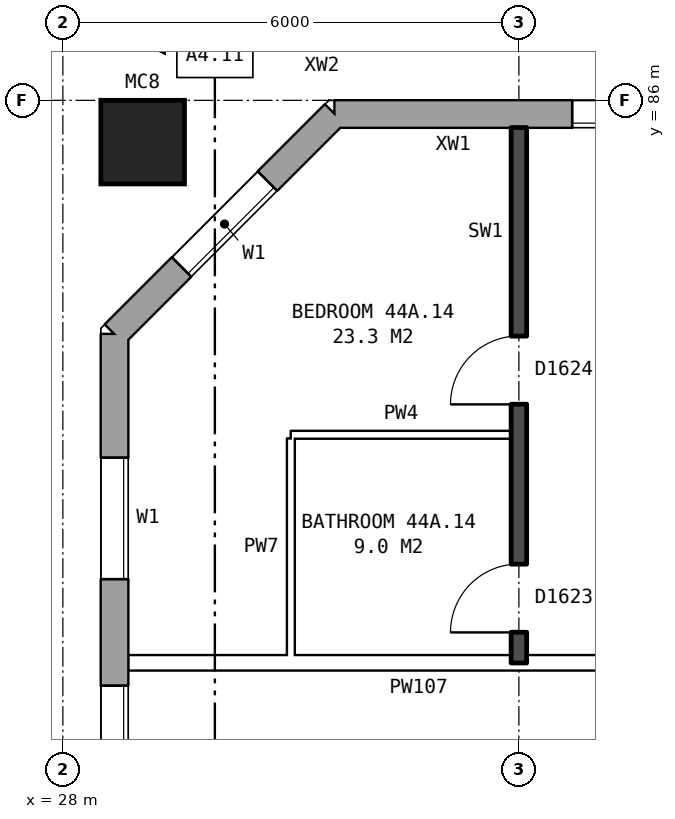
"""IFC4 building model, lengths in metres.
Left out: names, types, materials, properties, quantities, classifications, styles, units other than length and angle.
Written with IfcOpenShell. Run it as: python <this file> out.ifc"""

import sys

from ifc_helpers import new_model, si_unit, direction, frame, frame_2d, origin, origin_2d, place, context, subcontext, project, spatial, rectangle, hollow_rectangle, extrude, element, fill, save


model = new_model("IFC4")
c1 = context("Model", 3, precision=1e-05, world=origin(), true_north=direction((0.0, 1.0)))
c2 = subcontext(c1, "Body", "Model", "MODEL_VIEW")
j1 = project(units=[si_unit("LENGTHUNIT", "METRE"), si_unit("PLANEANGLEUNIT", "RADIAN")], contexts=[c1])
p1 = place(None, origin())
s1 = spatial("IfcSite", under=j1, at=p1, CompositionType="ELEMENT")
p2 = place(p1, origin())
s2 = spatial("IfcBuilding", under=s1, at=p2, CompositionType="ELEMENT")
p3 = place(p2, frame((0.0, 0.0, 157.8)))
s3 = spatial("IfcBuildingStorey", under=s2, at=p3, CompositionType="ELEMENT", Elevation=157.8)
p4 = place(p3, frame((29.05, 85.45, 0.0), z_axis=(0.0, 0.0, 1.0), x_axis=(1.0, 0.0, 0.0)))
e1 = element("IfcColumn", 1, at=p4, inside=s3, PredefinedType="COLUMN", context=c2, shape_type="SweptSolid", body=[
    extrude(hollow_rectangle(XDim=1.1, YDim=1.1, WallThickness=0.06, at=origin_2d()), origin(), (0.0, 0.0, 1.0), 3.1),
])
p5 = place(p3, frame((72.925, 85.82, 0.0), z_axis=(0.0, 0.0, 1.0), x_axis=(-1.0, 0.0, 0.0)))
e2 = element("IfcWall", 2, at=p5, inside=s3, PredefinedType="STANDARD", context=c2, shape_type="SweptSolid", body=[
    extrude(rectangle(XDim=41.351, YDim=0.36, at=frame_2d((20.675, 0.0))), origin(), (0.0, 0.0, 1.0), 2.85),
])
p6 = place(p5, frame((0.625, 0.0, 0.8)))
e3 = element("IfcOpeningElement", 3, at=p6, cuts=e2, PredefinedType="OPENING", context=c2, shape_type="SweptSolid", body=[
    extrude(rectangle(XDim=1.6, YDim=1.8, at=frame_2d((0.8, 0.9))), frame((0.0, 0.19, 0.0), z_axis=(0.0, -1.0, 0.0), x_axis=(1.0, 0.0, 0.0)), (0.0, 0.0, 1.0), 0.38),
])
p7 = place(p5, frame((3.625, 0.0, 0.8)))
e4 = element("IfcOpeningElement", 4, at=p7, cuts=e2, PredefinedType="OPENING", context=c2, shape_type="SweptSolid", body=[
    extrude(rectangle(XDim=1.6, YDim=1.8, at=frame_2d((0.8, 0.9))), frame((0.0, 0.19, 0.0), z_axis=(0.0, -1.0, 0.0), x_axis=(1.0, 0.0, 0.0)), (0.0, 0.0, 1.0), 0.38),
])
p8 = place(p5, frame((6.625, 0.0, 0.8)))
e5 = element("IfcOpeningElement", 5, at=p8, cuts=e2, PredefinedType="OPENING", context=c2, shape_type="SweptSolid", body=[
    extrude(rectangle(XDim=1.6, YDim=1.8, at=frame_2d((0.8, 0.9))), frame((0.0, 0.19, 0.0), z_axis=(0.0, -1.0, 0.0), x_axis=(1.0, 0.0, 0.0)), (0.0, 0.0, 1.0), 0.38),
])
p9 = place(p5, frame((9.125, 0.0, 0.8)))
e6 = element("IfcOpeningElement", 6, at=p9, cuts=e2, PredefinedType="OPENING", context=c2, shape_type="SweptSolid", body=[
    extrude(rectangle(XDim=0.6, YDim=1.8, at=frame_2d((0.3, 0.9))), frame((0.0, 0.19, 0.0), z_axis=(0.0, -1.0, 0.0), x_axis=(1.0, 0.0, 0.0)), (0.0, 0.0, 1.0), 0.38),
])
p10 = place(p5, frame((12.125, 0.0, 0.8)))
e7 = element("IfcOpeningElement", 7, at=p10, cuts=e2, PredefinedType="OPENING", context=c2, shape_type="SweptSolid", body=[
    extrude(rectangle(XDim=0.8, YDim=0.9, at=frame_2d((0.4, 0.45))), frame((0.0, 0.19, 0.0), z_axis=(0.0, -1.0, 0.0), x_axis=(1.0, 0.0, 0.0)), (0.0, 0.0, 1.0), 0.38),
])
p11 = place(p5, frame((15.625, 0.0, 0.8)))
e8 = element("IfcOpeningElement", 8, at=p11, cuts=e2, PredefinedType="OPENING", context=c2, shape_type="SweptSolid", body=[
    extrude(rectangle(XDim=1.6, YDim=1.8, at=frame_2d((0.8, 0.9))), frame((0.0, 0.19, 0.0), z_axis=(0.0, -1.0, 0.0), x_axis=(1.0, 0.0, 0.0)), (0.0, 0.0, 1.0), 0.38),
])
p12 = place(p5, frame((18.625, 0.0, 0.8)))
e9 = element("IfcOpeningElement", 9, at=p12, cuts=e2, PredefinedType="OPENING", context=c2, shape_type="SweptSolid", body=[
    extrude(rectangle(XDim=1.6, YDim=1.8, at=frame_2d((0.8, 0.9))), frame((0.0, 0.19, 0.0), z_axis=(0.0, -1.0, 0.0), x_axis=(1.0, 0.0, 0.0)), (0.0, 0.0, 1.0), 0.38),
])
p13 = place(p5, frame((21.625, 0.0, 0.8)))
e10 = element("IfcOpeningElement", 10, at=p13, cuts=e2, PredefinedType="OPENING", context=c2, shape_type="SweptSolid", body=[
    extrude(rectangle(XDim=1.6, YDim=1.8, at=frame_2d((0.8, 0.9))), frame((0.0, 0.19, 0.0), z_axis=(0.0, -1.0, 0.0), x_axis=(1.0, 0.0, 0.0)), (0.0, 0.0, 1.0), 0.38),
])
p14 = place(p5, frame((24.625, 0.0, 0.8)))
e11 = element("IfcOpeningElement", 11, at=p14, cuts=e2, PredefinedType="OPENING", context=c2, shape_type="SweptSolid", body=[
    extrude(rectangle(XDim=1.6, YDim=1.8, at=frame_2d((0.8, 0.9))), frame((0.0, 0.19, 0.0), z_axis=(0.0, -1.0, 0.0), x_axis=(1.0, 0.0, 0.0)), (0.0, 0.0, 1.0), 0.38),
])
p15 = place(p5, frame((27.125, 0.0, 0.8)))
e12 = element("IfcOpeningElement", 12, at=p15, cuts=e2, PredefinedType="OPENING", context=c2, shape_type="SweptSolid", body=[
    extrude(rectangle(XDim=0.8, YDim=1.8, at=frame_2d((0.4, 0.9))), frame((0.0, 0.19, 0.0), z_axis=(0.0, -1.0, 0.0), x_axis=(1.0, 0.0, 0.0)), (0.0, 0.0, 1.0), 0.38),
])
p16 = place(p5, frame((28.225, 0.0, 0.8)))
e13 = element("IfcOpeningElement", 13, at=p16, cuts=e2, PredefinedType="OPENING", context=c2, shape_type="SweptSolid", body=[
    extrude(rectangle(XDim=1.0, YDim=0.9, at=frame_2d((0.5, 0.45))), frame((0.0, 0.19, 0.0), z_axis=(0.0, -1.0, 0.0), x_axis=(1.0, 0.0, 0.0)), (0.0, 0.0, 1.0), 0.38),
])
p17 = place(p5, frame((33.625, 0.0, 0.8)))
e14 = element("IfcOpeningElement", 14, at=p17, cuts=e2, PredefinedType="OPENING", context=c2, shape_type="SweptSolid", body=[
    extrude(rectangle(XDim=1.6, YDim=1.8, at=frame_2d((0.8, 0.9))), frame((0.0, 0.19, 0.0), z_axis=(0.0, -1.0, 0.0), x_axis=(1.0, 0.0, 0.0)), (0.0, 0.0, 1.0), 0.38),
])
p18 = place(p5, frame((36.625, 0.0, 0.8)))
e15 = element("IfcOpeningElement", 15, at=p18, cuts=e2, PredefinedType="OPENING", context=c2, shape_type="SweptSolid", body=[
    extrude(rectangle(XDim=1.6, YDim=1.8, at=frame_2d((0.8, 0.9))), frame((0.0, 0.19, 0.0), z_axis=(0.0, -1.0, 0.0), x_axis=(1.0, 0.0, 0.0)), (0.0, 0.0, 1.0), 0.38),
])
p19 = place(p5, frame((10.025, 0.0, 1.7)))
e16 = element("IfcOpeningElement", 16, at=p19, cuts=e2, PredefinedType="OPENING", context=c2, shape_type="SweptSolid", body=[
    extrude(rectangle(XDim=0.8, YDim=0.9, at=frame_2d((0.4, 0.45))), frame((0.0, 0.19, 0.0), z_axis=(0.0, -1.0, 0.0), x_axis=(1.0, 0.0, 0.0)), (0.0, 0.0, 1.0), 0.38),
])
p20 = place(p5, frame((13.275, 0.0, 0.8)))
e17 = element("IfcOpeningElement", 17, at=p20, cuts=e2, PredefinedType="OPENING", context=c2, shape_type="SweptSolid", body=[
    extrude(rectangle(XDim=1.4, YDim=1.8, at=frame_2d((0.7, 0.9))), frame((0.0, 0.19, 0.0), z_axis=(0.0, -1.0, 0.0), x_axis=(1.0, 0.0, 0.0)), (0.0, 0.0, 1.0), 0.38),
])
p21 = place(p5, frame((30.475, 0.0, 1.7)))
e18 = element("IfcOpeningElement", 18, at=p21, cuts=e2, PredefinedType="OPENING", context=c2, shape_type="SweptSolid", body=[
    extrude(rectangle(XDim=0.8, YDim=0.9, at=frame_2d((0.4, 0.45))), frame((0.0, 0.19, 0.0), z_axis=(0.0, -1.0, 0.0), x_axis=(1.0, 0.0, 0.0)), (0.0, 0.0, 1.0), 0.38),
])
p22 = place(p5, frame((31.625, 0.0, 0.8)))
e19 = element("IfcOpeningElement", 19, at=p22, cuts=e2, PredefinedType="OPENING", context=c2, shape_type="SweptSolid", body=[
    extrude(rectangle(XDim=1.0, YDim=1.8, at=frame_2d((0.5, 0.9))), frame((0.0, 0.19, 0.0), z_axis=(0.0, -1.0, 0.0), x_axis=(1.0, 0.0, 0.0)), (0.0, 0.0, 1.0), 0.38),
])
p23 = place(p3, frame((31.575, 85.82, 0.0), z_axis=(0.0, 0.0, 1.0), x_axis=(-0.707106781187, -0.707106781187, 0.0)))
e20 = element("IfcWall", 20, at=p23, inside=s3, PredefinedType="STANDARD", context=c2, shape_type="SweptSolid", body=[
    extrude(rectangle(XDim=4.094, YDim=0.36, at=frame_2d((2.047, 0.0))), origin(), (0.0, 0.0, 1.0), 2.85),
])
p24 = place(p23, frame((1.247, 0.0, 0.8)))
e21 = element("IfcOpeningElement", 21, at=p24, cuts=e20, PredefinedType="OPENING", context=c2, shape_type="SweptSolid", body=[
    extrude(rectangle(XDim=1.6, YDim=1.8, at=frame_2d((0.8, 0.9))), frame((0.0, 0.19, 0.0), z_axis=(0.0, -1.0, 0.0), x_axis=(1.0, 0.0, 0.0)), (0.0, 0.0, 1.0), 0.38),
])
p25 = place(p3, frame((28.68, 82.925, 0.0), z_axis=(0.0, 0.0, 1.0), x_axis=(0.0, -1.0, 0.0)))
e22 = element("IfcWall", 22, at=p25, inside=s3, PredefinedType="STANDARD", context=c2, shape_type="SweptSolid", body=[
    extrude(rectangle(XDim=25.851, YDim=0.36, at=frame_2d((12.925, 0.0))), origin(), (0.0, 0.0, 1.0), 2.85),
])
p26 = place(p25, frame((1.625, 0.0, 0.8)))
e23 = element("IfcOpeningElement", 23, at=p26, cuts=e22, PredefinedType="OPENING", context=c2, shape_type="SweptSolid", body=[
    extrude(rectangle(XDim=1.6, YDim=1.8, at=frame_2d((0.8, 0.9))), frame((0.0, 0.19, 0.0), z_axis=(0.0, -1.0, 0.0), x_axis=(1.0, 0.0, 0.0)), (0.0, 0.0, 1.0), 0.38),
])
p27 = place(p25, frame((4.625, 0.0, 0.8)))
e24 = element("IfcOpeningElement", 24, at=p27, cuts=e22, PredefinedType="OPENING", context=c2, shape_type="SweptSolid", body=[
    extrude(rectangle(XDim=1.6, YDim=1.8, at=frame_2d((0.8, 0.9))), frame((0.0, 0.19, 0.0), z_axis=(0.0, -1.0, 0.0), x_axis=(1.0, 0.0, 0.0)), (0.0, 0.0, 1.0), 0.38),
])
p28 = place(p25, frame((6.525, 0.0, 0.8)))
e25 = element("IfcOpeningElement", 25, at=p28, cuts=e22, PredefinedType="OPENING", context=c2, shape_type="SweptSolid", body=[
    extrude(rectangle(XDim=1.6, YDim=1.5, at=frame_2d((0.8, 0.75))), frame((0.0, 0.19, 0.0), z_axis=(0.0, -1.0, 0.0), x_axis=(1.0, 0.0, 0.0)), (0.0, 0.0, 1.0), 0.38),
])
p29 = place(p25, frame((8.425, 0.0, 0.8)))
e26 = element("IfcOpeningElement", 26, at=p29, cuts=e22, PredefinedType="OPENING", context=c2, shape_type="SweptSolid", body=[
    extrude(rectangle(XDim=0.6, YDim=0.9, at=frame_2d((0.3, 0.45))), frame((0.0, 0.19, 0.0), z_axis=(0.0, -1.0, 0.0), x_axis=(1.0, 0.0, 0.0)), (0.0, 0.0, 1.0), 0.38),
])
p30 = place(p25, frame((10.225, 0.0, 1.7)))
e27 = element("IfcOpeningElement", 27, at=p30, cuts=e22, PredefinedType="OPENING", context=c2, shape_type="SweptSolid", body=[
    extrude(rectangle(XDim=1.2, YDim=0.9, at=frame_2d((0.6, 0.45))), frame((0.0, 0.19, 0.0), z_axis=(0.0, -1.0, 0.0), x_axis=(1.0, 0.0, 0.0)), (0.0, 0.0, 1.0), 0.38),
])
p31 = place(p25, frame((11.725, 0.0, 0.8)))
e28 = element("IfcOpeningElement", 28, at=p31, cuts=e22, PredefinedType="OPENING", context=c2, shape_type="SweptSolid", body=[
    extrude(rectangle(XDim=1.6, YDim=1.8, at=frame_2d((0.8, 0.9))), frame((0.0, 0.19, 0.0), z_axis=(0.0, -1.0, 0.0), x_axis=(1.0, 0.0, 0.0)), (0.0, 0.0, 1.0), 0.38),
])
p32 = place(p25, frame((19.625, 0.0, 0.8)))
e29 = element("IfcOpeningElement", 29, at=p32, cuts=e22, PredefinedType="OPENING", context=c2, shape_type="SweptSolid", body=[
    extrude(rectangle(XDim=1.6, YDim=1.8, at=frame_2d((0.8, 0.9))), frame((0.0, 0.19, 0.0), z_axis=(0.0, -1.0, 0.0), x_axis=(1.0, 0.0, 0.0)), (0.0, 0.0, 1.0), 0.38),
])
p33 = place(p25, frame((22.625, 0.0, 0.8)))
e30 = element("IfcOpeningElement", 30, at=p33, cuts=e22, PredefinedType="OPENING", context=c2, shape_type="SweptSolid", body=[
    extrude(rectangle(XDim=1.6, YDim=1.8, at=frame_2d((0.8, 0.9))), frame((0.0, 0.19, 0.0), z_axis=(0.0, -1.0, 0.0), x_axis=(1.0, 0.0, 0.0)), (0.0, 0.0, 1.0), 0.38),
])
p34 = place(p25, frame((13.625, 0.0, 1.1)))
e31 = element("IfcOpeningElement", 31, at=p34, cuts=e22, PredefinedType="OPENING", context=c2, shape_type="SweptSolid", body=[
    extrude(rectangle(XDim=1.0, YDim=1.5, at=frame_2d((0.5, 0.75))), frame((0.0, 0.19, 0.0), z_axis=(0.0, -1.0, 0.0), x_axis=(1.0, 0.0, 0.0)), (0.0, 0.0, 1.0), 0.38),
])
p35 = place(p25, frame((14.925, 0.0, 1.7)))
e32 = element("IfcOpeningElement", 32, at=p35, cuts=e22, PredefinedType="OPENING", context=c2, shape_type="SweptSolid", body=[
    extrude(rectangle(XDim=0.6, YDim=0.9, at=frame_2d((0.3, 0.45))), frame((0.0, 0.19, 0.0), z_axis=(0.0, -1.0, 0.0), x_axis=(1.0, 0.0, 0.0)), (0.0, 0.0, 1.0), 0.38),
])
p36 = place(p25, frame((16.675, 0.0, 0.8)))
e33 = element("IfcOpeningElement", 33, at=p36, cuts=e22, PredefinedType="OPENING", context=c2, shape_type="SweptSolid", body=[
    extrude(rectangle(XDim=0.6, YDim=0.9, at=frame_2d((0.3, 0.45))), frame((0.0, 0.19, 0.0), z_axis=(0.0, -1.0, 0.0), x_axis=(1.0, 0.0, 0.0)), (0.0, 0.0, 1.0), 0.38),
])
p37 = place(p25, frame((17.675, 0.0, 0.8)))
e34 = element("IfcOpeningElement", 34, at=p37, cuts=e22, PredefinedType="OPENING", context=c2, shape_type="SweptSolid", body=[
    extrude(rectangle(XDim=1.6, YDim=1.5, at=frame_2d((0.8, 0.75))), frame((0.0, 0.19, 0.0), z_axis=(0.0, -1.0, 0.0), x_axis=(1.0, 0.0, 0.0)), (0.0, 0.0, 1.0), 0.38),
])
p38 = place(p3, frame((28.86, 78.6, 0.0), z_axis=(0.0, 0.0, 1.0), x_axis=(1.0, 0.0, 0.0)))
e35 = element("IfcWall", 35, at=p38, inside=s3, PredefinedType="PARTITIONING", context=c2, shape_type="SweptSolid", body=[
    extrude(rectangle(XDim=17.04, YDim=0.2, at=frame_2d((8.52, 0.0))), origin(), (0.0, 0.0, 1.0), 2.85),
])
p39 = place(p38, frame((14.59, 0.0, 0.0)))
e36 = element("IfcOpeningElement", 36, at=p39, cuts=e35, PredefinedType="OPENING", context=c2, shape_type="SweptSolid", body=[
    extrude(rectangle(XDim=1.0, YDim=2.1, at=frame_2d((0.5, 1.05))), frame((0.0, 0.11, 0.0), z_axis=(0.0, -1.0, 0.0), x_axis=(1.0, 0.0, 0.0)), (0.0, 0.0, 1.0), 0.22),
])
p40 = place(p38, frame((7.64, 0.0, 0.0)))
e37 = element("IfcOpeningElement", 37, at=p40, cuts=e35, PredefinedType="OPENING", context=c2, shape_type="SweptSolid", body=[
    extrude(rectangle(XDim=1.0, YDim=2.1, at=frame_2d((0.5, 1.05))), frame((0.0, 0.11, 0.0), z_axis=(0.0, -1.0, 0.0), x_axis=(1.0, 0.0, 0.0)), (0.0, 0.0, 1.0), 0.22),
])
p41 = place(p3, frame((31.0, 81.6, 0.0), z_axis=(0.0, 0.0, 1.0), x_axis=(1.0, 0.0, 0.0)))
e38 = element("IfcWall", 38, at=p41, inside=s3, PredefinedType="PARTITIONING", context=c2, shape_type="SweptSolid", body=[
    extrude(rectangle(XDim=2.9, YDim=0.1, at=frame_2d((1.45, 0.0))), origin(), (0.0, 0.0, 1.0), 2.85),
])
p42 = place(p3, frame((31.0, 78.7, 0.0), z_axis=(0.0, 0.0, 1.0), x_axis=(0.0, 1.0, 0.0)))
e39 = element("IfcWall", 39, at=p42, inside=s3, PredefinedType="PARTITIONING", context=c2, shape_type="SweptSolid", body=[
    extrude(rectangle(XDim=2.85, YDim=0.1, at=frame_2d((1.425, 0.0))), origin(), (0.0, 0.0, 1.0), 2.85),
])
p43 = place(p3, frame((34.0, 78.6, 0.0), z_axis=(0.0, 0.0, 1.0), x_axis=(0.0, 1.0, 0.0)))
e40 = element("IfcWall", 40, at=p43, inside=s3, PredefinedType="SOLIDWALL", context=c2, shape_type="SweptSolid", body=[
    extrude(rectangle(XDim=7.04, YDim=0.2, at=frame_2d((3.52, 0.0))), origin(), (0.0, 0.0, 1.0), 2.85),
])
p44 = place(p43, frame((3.4, 0.0, 0.0)))
e41 = element("IfcOpeningElement", 41, at=p44, cuts=e40, PredefinedType="OPENING", context=c2, shape_type="SweptSolid", body=[
    extrude(rectangle(XDim=0.9, YDim=2.1, at=frame_2d((0.45, 1.05))), frame((0.0, 0.11, 0.0), z_axis=(0.0, -1.0, 0.0), x_axis=(1.0, 0.0, 0.0)), (0.0, 0.0, 1.0), 0.22),
])
p45 = place(p43, frame((0.4, 0.0, 0.0)))
e42 = element("IfcOpeningElement", 42, at=p45, cuts=e40, PredefinedType="OPENING", context=c2, shape_type="SweptSolid", body=[
    extrude(rectangle(XDim=0.9, YDim=2.1, at=frame_2d((0.45, 1.05))), frame((0.0, 0.11, 0.0), z_axis=(0.0, -1.0, 0.0), x_axis=(1.0, 0.0, 0.0)), (0.0, 0.0, 1.0), 0.22),
])
p46 = place(p18, origin())
e43 = element("IfcWindow", 43, at=p46, inside=s3, PartitioningType="SINGLE_PANEL", PredefinedType="WINDOW", context=c2, shape_type="SweptSolid", body=[
    extrude(rectangle(XDim=1.6, YDim=1.8, at=frame_2d((0.8, 0.9))), frame((0.0, 0.15, 0.0), z_axis=(0.0, -1.0, 0.0), x_axis=(1.0, 0.0, 0.0)), (0.0, 0.0, 1.0), 0.06),
])
fill(e15, e43)
p47 = place(p24, origin())
e44 = element("IfcWindow", 44, at=p47, inside=s3, PartitioningType="SINGLE_PANEL", PredefinedType="WINDOW", context=c2, shape_type="SweptSolid", body=[
    extrude(rectangle(XDim=1.6, YDim=1.8, at=frame_2d((0.8, 0.9))), frame((0.0, 0.15, 0.0), z_axis=(0.0, -1.0, 0.0), x_axis=(1.0, 0.0, 0.0)), (0.0, 0.0, 1.0), 0.06),
])
fill(e21, e44)
p48 = place(p26, origin())
e45 = element("IfcWindow", 45, at=p48, inside=s3, PartitioningType="SINGLE_PANEL", PredefinedType="WINDOW", context=c2, shape_type="SweptSolid", body=[
    extrude(rectangle(XDim=1.6, YDim=1.8, at=frame_2d((0.8, 0.9))), frame((0.0, 0.15, 0.0), z_axis=(0.0, -1.0, 0.0), x_axis=(1.0, 0.0, 0.0)), (0.0, 0.0, 1.0), 0.06),
])
fill(e23, e45)
p49 = place(p27, origin())
e46 = element("IfcWindow", 46, at=p49, inside=s3, PartitioningType="SINGLE_PANEL", PredefinedType="WINDOW", context=c2, shape_type="SweptSolid", body=[
    extrude(rectangle(XDim=1.6, YDim=1.8, at=frame_2d((0.8, 0.9))), frame((0.0, 0.15, 0.0), z_axis=(0.0, -1.0, 0.0), x_axis=(1.0, 0.0, 0.0)), (0.0, 0.0, 1.0), 0.06),
])
fill(e24, e46)
p50 = place(p44, origin())
e47 = element("IfcDoor", 47, at=p50, inside=s3, OperationType="SINGLE_SWING_LEFT", PredefinedType="DOOR", context=c2, shape_type="SweptSolid", body=[
    extrude(rectangle(XDim=0.9, YDim=2.1, at=frame_2d((0.45, 1.05))), frame((0.0, 0.025, 0.0), z_axis=(0.0, -1.0, 0.0), x_axis=(1.0, 0.0, 0.0)), (0.0, 0.0, 1.0), 0.05),
])
fill(e41, e47)
p51 = place(p45, origin())
e48 = element("IfcDoor", 48, at=p51, inside=s3, OperationType="SINGLE_SWING_LEFT", PredefinedType="DOOR", context=c2, shape_type="SweptSolid", body=[
    extrude(rectangle(XDim=0.9, YDim=2.1, at=frame_2d((0.45, 1.05))), frame((0.0, 0.025, 0.0), z_axis=(0.0, -1.0, 0.0), x_axis=(1.0, 0.0, 0.0)), (0.0, 0.0, 1.0), 0.05),
])
fill(e42, e48)
save(model, sys.argv[1])
